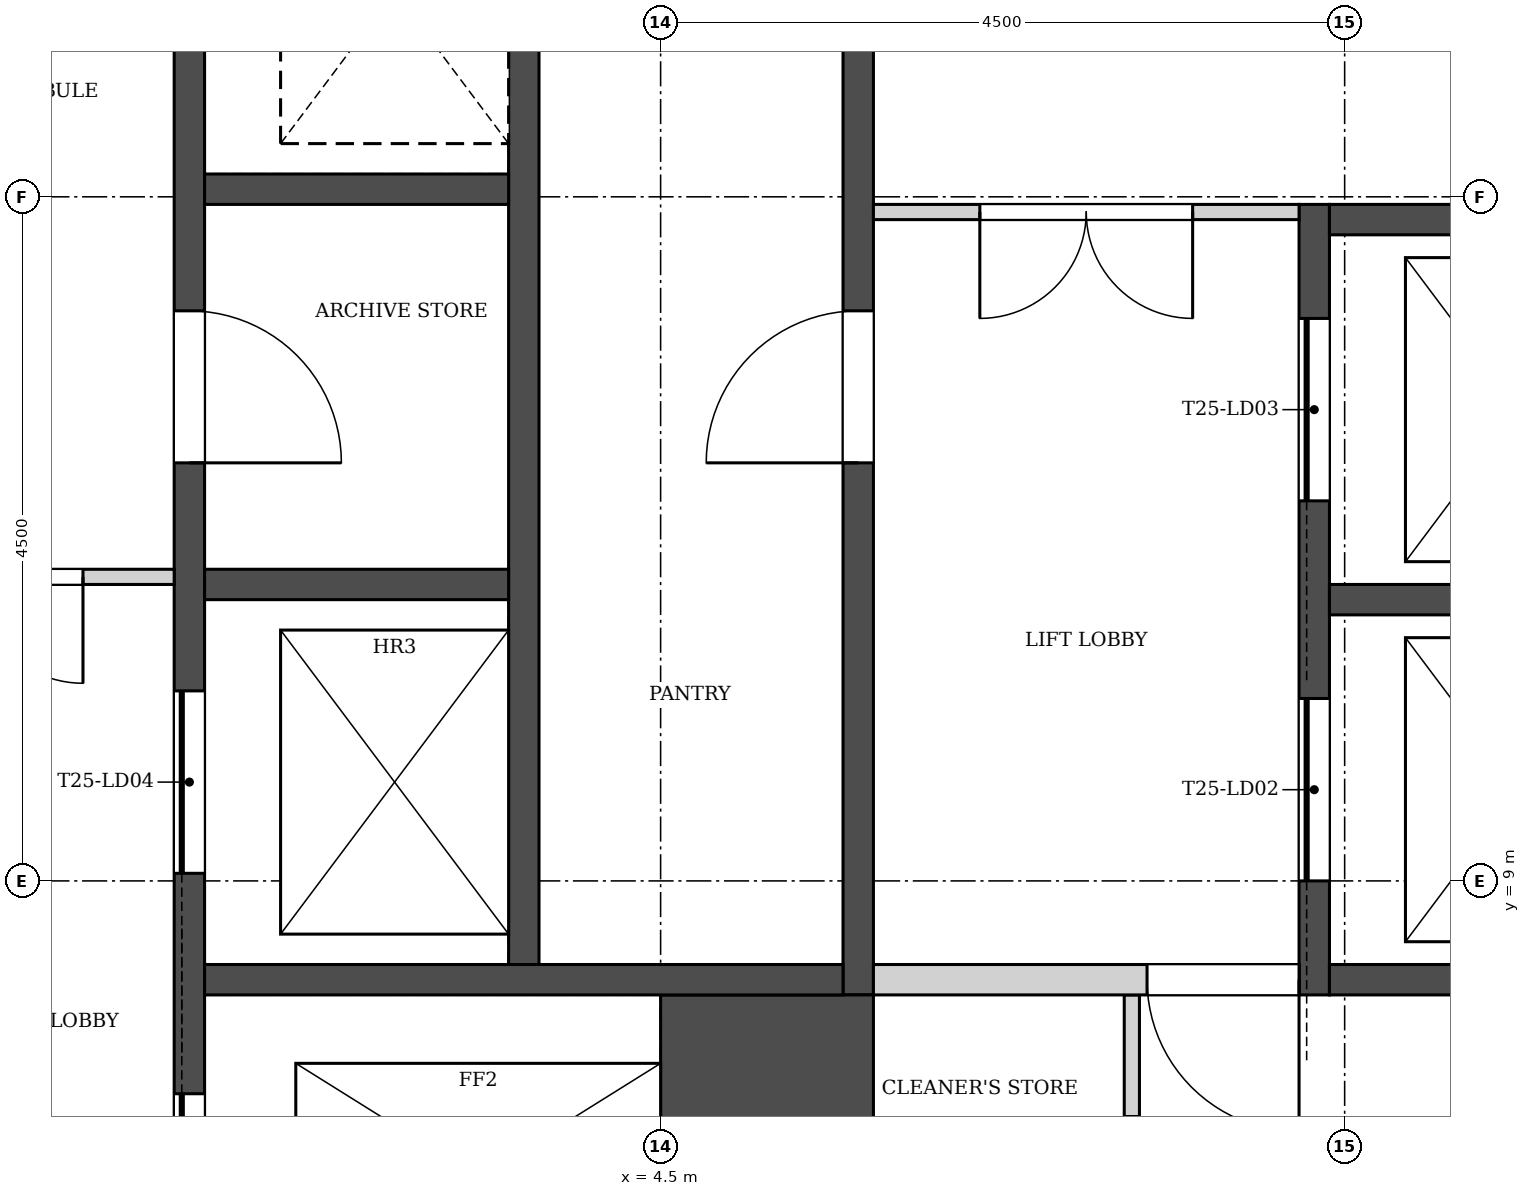
"""IFC4 building model, lengths in metres.
Left out: names, types, materials, properties, quantities, classifications, styles, units other than length and angle.
Written with IfcOpenShell. Run it as: python <this file> out.ifc"""

import sys

from ifc_helpers import new_model, si_unit, direction, frame, frame_2d, origin, place, context, subcontext, project, spatial, rectangle, extrude, element, fill, save


model = new_model("IFC4")
c1 = context("Model", 3, precision=1e-05, world=origin(), true_north=direction((0.0, 1.0)))
c2 = subcontext(c1, "Body", "Model", "MODEL_VIEW")
j1 = project(units=[si_unit("LENGTHUNIT", "METRE"), si_unit("PLANEANGLEUNIT", "RADIAN")], contexts=[c1])
p1 = place(None, origin())
s1 = spatial("IfcSite", under=j1, at=p1, CompositionType="ELEMENT")
p2 = place(p1, origin())
s2 = spatial("IfcBuilding", under=s1, at=p2, CompositionType="ELEMENT")
p3 = place(p2, frame((0.0, 0.0, 339.3)))
s3 = spatial("IfcBuildingStorey", under=s2, at=p3, CompositionType="ELEMENT", Elevation=339.3)
p4 = place(p3, frame((13.054, 10.692, 0.0), z_axis=(0.0, 0.0, 1.0), x_axis=(-0.500015780397, 0.866016292776, 0.0)))
e1 = element("IfcWall", 1, at=p4, inside=s3, PredefinedType="SHEAR", context=c2, shape_type="SweptSolid", body=[
    extrude(rectangle(XDim=8.67, YDim=0.8, at=frame_2d((4.335, 0.0))), origin(), (0.0, 0.0, 1.0), 5.4),
])
p5 = place(p3, frame((8.8, 8.25, -0.4), z_axis=(0.0, 0.0, 1.0), x_axis=(0.0, 1.0, 0.0)))
e2 = element("IfcWall", 2, at=p5, inside=s3, PredefinedType="SOLIDWALL", context=c2, shape_type="SweptSolid", body=[
    extrude(rectangle(XDim=5.2, YDim=0.2, at=frame_2d((2.6, 0.0))), origin(), (0.0, 0.0, 1.0), 5.0),
])
p6 = place(p5, frame((0.75, 0.0, 0.4)))
e3 = element("IfcOpeningElement", 3, at=p6, cuts=e2, PredefinedType="OPENING", context=c2, shape_type="SweptSolid", body=[
    extrude(rectangle(XDim=1.2, YDim=2.1, at=frame_2d((0.6, 1.05))), frame((0.0, 0.11, 0.0), z_axis=(0.0, -1.0, 0.0), x_axis=(1.0, 0.0, 0.0)), (0.0, 0.0, 1.0), 0.22),
])
p7 = place(p5, frame((3.25, 0.0, 0.4)))
e4 = element("IfcOpeningElement", 4, at=p7, cuts=e2, PredefinedType="OPENING", context=c2, shape_type="SweptSolid", body=[
    extrude(rectangle(XDim=1.2, YDim=2.1, at=frame_2d((0.6, 1.05))), frame((0.0, 0.11, 0.0), z_axis=(0.0, -1.0, 0.0), x_axis=(1.0, 0.0, 0.0)), (0.0, 0.0, 1.0), 0.22),
])
p8 = place(p3, frame((5.8, 8.25, -0.4), z_axis=(0.0, 0.0, 1.0), x_axis=(0.0, 1.0, 0.0)))
e5 = element("IfcWall", 5, at=p8, inside=s3, PredefinedType="SOLIDWALL", context=c2, shape_type="SweptSolid", body=[
    extrude(rectangle(XDim=8.0, YDim=0.2, at=frame_2d((4.0, 0.0))), origin(), (0.0, 0.0, 1.0), 5.0),
])
p9 = place(p8, frame((3.5, 0.0, 0.4)))
e6 = element("IfcOpeningElement", 6, at=p9, cuts=e5, PredefinedType="OPENING", context=c2, shape_type="SweptSolid", body=[
    extrude(rectangle(XDim=1.0, YDim=2.1, at=frame_2d((0.5, 1.05))), frame((0.0, 0.11, 0.0), z_axis=(0.0, -1.0, 0.0), x_axis=(1.0, 0.0, 0.0)), (0.0, 0.0, 1.0), 0.22),
])
p10 = place(p3, frame((3.6, 8.45, -0.4), z_axis=(0.0, 0.0, 1.0), x_axis=(0.0, 1.0, 0.0)))
e7 = element("IfcWall", 7, at=p10, inside=s3, PredefinedType="SOLIDWALL", context=c2, shape_type="SweptSolid", body=[
    extrude(rectangle(XDim=7.8, YDim=0.2, at=frame_2d((3.9, 0.0))), origin(), (0.0, 0.0, 1.0), 5.0),
])
p11 = place(p3, frame((1.4, 5.85, -0.4), z_axis=(0.0, 0.0, 1.0), x_axis=(0.0, 1.0, 0.0)))
e8 = element("IfcWall", 8, at=p11, inside=s3, PredefinedType="SOLIDWALL", context=c2, shape_type="SweptSolid", body=[
    extrude(rectangle(XDim=11.75, YDim=0.2, at=frame_2d((5.875, 0.0))), origin(), (0.0, 0.0, 1.0), 5.0),
])
p12 = place(p11, frame((3.2, 0.0, 0.4)))
e9 = element("IfcOpeningElement", 9, at=p12, cuts=e8, PredefinedType="OPENING", context=c2, shape_type="SweptSolid", body=[
    extrude(rectangle(XDim=1.2, YDim=2.1, at=frame_2d((0.6, 1.05))), frame((0.0, 0.11, 0.0), z_axis=(0.0, -1.0, 0.0), x_axis=(1.0, 0.0, 0.0)), (0.0, 0.0, 1.0), 0.22),
])
p13 = place(p11, frame((0.65, 0.0, 0.4)))
e10 = element("IfcOpeningElement", 10, at=p13, cuts=e8, PredefinedType="OPENING", context=c2, shape_type="SweptSolid", body=[
    extrude(rectangle(XDim=1.1, YDim=2.1, at=frame_2d((0.55, 1.05))), frame((0.0, 0.11, 0.0), z_axis=(0.0, -1.0, 0.0), x_axis=(1.0, 0.0, 0.0)), (0.0, 0.0, 1.0), 0.22),
])
p14 = place(p11, frame((5.9, 0.0, 0.4)))
e11 = element("IfcOpeningElement", 11, at=p14, cuts=e8, PredefinedType="OPENING", context=c2, shape_type="SweptSolid", body=[
    extrude(rectangle(XDim=1.0, YDim=2.1, at=frame_2d((0.5, 1.05))), frame((0.0, 0.11, 0.0), z_axis=(0.0, -1.0, 0.0), x_axis=(1.0, 0.0, 0.0)), (0.0, 0.0, 1.0), 0.22),
])
p15 = place(p3, frame((5.2, 5.85, -0.4), z_axis=(0.0, 0.0, 1.0), x_axis=(0.0, 1.0, 0.0)))
e12 = element("IfcWall", 12, at=p15, inside=s3, PredefinedType="SOLIDWALL", context=c2, shape_type="SweptSolid", body=[
    extrude(rectangle(XDim=2.4, YDim=1.4, at=frame_2d((1.2, 0.0))), origin(), (0.0, 0.0, 1.0), 5.0),
])
p16 = place(p3, frame((8.9, 8.35, -0.4), z_axis=(0.0, 0.0, 1.0), x_axis=(1.0, 0.0, 0.0)))
e13 = element("IfcWall", 13, at=p16, inside=s3, PredefinedType="SOLIDWALL", context=c2, shape_type="SweptSolid", body=[
    extrude(rectangle(XDim=2.0, YDim=0.2, at=frame_2d((1.0, 0.0))), origin(), (0.0, 0.0, 1.0), 5.0),
])
p17 = place(p3, frame((1.5, 8.35, -0.4), z_axis=(0.0, 0.0, 1.0), x_axis=(1.0, 0.0, 0.0)))
e14 = element("IfcWall", 14, at=p17, inside=s3, PredefinedType="SOLIDWALL", context=c2, shape_type="SweptSolid", body=[
    extrude(rectangle(XDim=4.2, YDim=0.2, at=frame_2d((2.1, 0.0))), origin(), (0.0, 0.0, 1.0), 5.0),
])
for number, where, z_axis, x_axis in (
    (15, (8.9, 10.85, -0.4), (0.0, 0.0, 1.0), (1.0, 0.0, 0.0)),
    (16, (8.9, 13.35, -0.4), (0.0, 0.0, 1.0), (1.0, 0.0, 0.0)),
    (17, (1.5, 10.95, -0.4), (0.0, 0.0, 1.0), (1.0, 0.0, 0.0)),
    (18, (1.5, 13.55, -0.4), (0.0, 0.0, 1.0), (1.0, 0.0, 0.0)),
):
    element("IfcWall", number, at=place(p3, frame(where, z_axis=z_axis, x_axis=x_axis)), inside=s3, PredefinedType="SOLIDWALL", context=c2, shape_type="SweptSolid", body=[
        extrude(rectangle(XDim=2.0, YDim=0.2, at=frame_2d((1.0, 0.0))), origin(), (0.0, 0.0, 1.0), 5.0),
    ])
p18 = place(p3, frame((5.9, 13.4, 0.0), z_axis=(0.0, 0.0, 1.0), x_axis=(1.0, 0.0, 0.0)))
e19 = element("IfcWall", 19, at=p18, inside=s3, PredefinedType="PARTITIONING", context=c2, shape_type="SweptSolid", body=[
    extrude(rectangle(XDim=2.8, YDim=0.1, at=frame_2d((1.4, 0.0))), origin(), (0.0, 0.0, 1.0), 4.6),
])
p19 = place(p18, frame((0.7, 0.0, 0.0)))
e20 = element("IfcOpeningElement", 20, at=p19, cuts=e19, PredefinedType="OPENING", context=c2, shape_type="SweptSolid", body=[
    extrude(rectangle(XDim=1.4, YDim=2.1, at=frame_2d((0.7, 1.05))), frame((0.0, 0.06, 0.0), z_axis=(0.0, -1.0, 0.0), x_axis=(1.0, 0.0, 0.0)), (0.0, 0.0, 1.0), 0.12),
])
p20 = place(p3, frame((7.6, 5.85, 0.0), z_axis=(0.0, 0.0, 1.0), x_axis=(0.0, 1.0, 0.0)))
e21 = element("IfcWall", 21, at=p20, inside=s3, PredefinedType="PARTITIONING", context=c2, shape_type="SweptSolid", body=[
    extrude(rectangle(XDim=2.4, YDim=0.1, at=frame_2d((1.2, 0.0))), origin(), (0.0, 0.0, 1.0), 4.6),
])
p21 = place(p20, frame((0.7, 0.0, 0.0)))
e22 = element("IfcOpeningElement", 22, at=p21, cuts=e21, PredefinedType="OPENING", context=c2, shape_type="SweptSolid", body=[
    extrude(rectangle(XDim=0.9, YDim=2.1, at=frame_2d((0.45, 1.05))), frame((0.0, 0.06, 0.0), z_axis=(0.0, -1.0, 0.0), x_axis=(1.0, 0.0, 0.0)), (0.0, 0.0, 1.0), 0.12),
])
p22 = place(p3, frame((5.9, 8.35, 0.0), z_axis=(0.0, 0.0, 1.0), x_axis=(1.0, 0.0, 0.0)))
e23 = element("IfcWall", 23, at=p22, inside=s3, PredefinedType="SOLIDWALL", context=c2, shape_type="SweptSolid", body=[
    extrude(rectangle(XDim=2.8, YDim=0.2, at=frame_2d((1.4, 0.0))), origin(), (0.0, 0.0, 1.0), 4.6),
])
p23 = place(p22, frame((1.8, 0.0, 0.0)))
e24 = element("IfcOpeningElement", 24, at=p23, cuts=e23, PredefinedType="OPENING", context=c2, shape_type="SweptSolid", body=[
    extrude(rectangle(XDim=1.0, YDim=2.1, at=frame_2d((0.5, 1.05))), frame((0.0, 0.11, 0.0), z_axis=(0.0, -1.0, 0.0), x_axis=(1.0, 0.0, 0.0)), (0.0, 0.0, 1.0), 0.22),
])
p24 = place(p3, frame((-1.3, 11.0, 0.0), z_axis=(0.0, 0.0, 1.0), x_axis=(1.0, 0.0, 0.0)))
e25 = element("IfcWall", 25, at=p24, inside=s3, PredefinedType="PARTITIONING", context=c2, shape_type="SweptSolid", body=[
    extrude(rectangle(XDim=2.6, YDim=0.1, at=frame_2d((1.3, 0.0))), origin(), (0.0, 0.0, 1.0), 4.6),
])
p25 = place(p24, frame((0.6, 0.0, 0.0)))
e26 = element("IfcOpeningElement", 26, at=p25, cuts=e25, PredefinedType="OPENING", context=c2, shape_type="SweptSolid", body=[
    extrude(rectangle(XDim=1.4, YDim=2.1, at=frame_2d((0.7, 1.05))), frame((0.0, 0.06, 0.0), z_axis=(0.0, -1.0, 0.0), x_axis=(1.0, 0.0, 0.0)), (0.0, 0.0, 1.0), 0.12),
])
p26 = place(p6, origin())
e27 = element("IfcDoor", 27, at=p26, inside=s3, OperationType="SLIDING_TO_LEFT", PredefinedType="DOOR", context=c2, shape_type="SweptSolid", body=[
    extrude(rectangle(XDim=1.2, YDim=2.1, at=frame_2d((0.6, 1.05))), frame((0.0, 0.025, 0.0), z_axis=(0.0, -1.0, 0.0), x_axis=(1.0, 0.0, 0.0)), (0.0, 0.0, 1.0), 0.05),
])
fill(e3, e27)
p27 = place(p7, origin())
e28 = element("IfcDoor", 28, at=p27, inside=s3, OperationType="SLIDING_TO_LEFT", PredefinedType="DOOR", context=c2, shape_type="SweptSolid", body=[
    extrude(rectangle(XDim=1.2, YDim=2.1, at=frame_2d((0.6, 1.05))), frame((0.0, 0.025, 0.0), z_axis=(0.0, -1.0, 0.0), x_axis=(1.0, 0.0, 0.0)), (0.0, 0.0, 1.0), 0.05),
])
fill(e4, e28)
p28 = place(p12, origin())
e29 = element("IfcDoor", 29, at=p28, inside=s3, OperationType="SLIDING_TO_LEFT", PredefinedType="DOOR", context=c2, shape_type="SweptSolid", body=[
    extrude(rectangle(XDim=1.2, YDim=2.1, at=frame_2d((0.6, 1.05))), frame((0.0, 0.025, 0.0), z_axis=(0.0, -1.0, 0.0), x_axis=(1.0, 0.0, 0.0)), (0.0, 0.0, 1.0), 0.05),
])
fill(e9, e29)
p29 = place(p13, origin())
e30 = element("IfcDoor", 30, at=p29, inside=s3, OperationType="SLIDING_TO_RIGHT", PredefinedType="DOOR", context=c2, shape_type="SweptSolid", body=[
    extrude(rectangle(XDim=1.1, YDim=2.1, at=frame_2d((0.55, 1.05))), frame((0.0, 0.025, 0.0), z_axis=(0.0, -1.0, 0.0), x_axis=(1.0, 0.0, 0.0)), (0.0, 0.0, 1.0), 0.05),
])
fill(e10, e30)
p30 = place(p9, origin())
e31 = element("IfcDoor", 31, at=p30, inside=s3, OperationType="SINGLE_SWING_LEFT", PredefinedType="DOOR", context=c2, shape_type="SweptSolid", body=[
    extrude(rectangle(XDim=1.0, YDim=2.1, at=frame_2d((0.5, 1.05))), frame((0.0, 0.025, 0.0), z_axis=(0.0, -1.0, 0.0), x_axis=(1.0, 0.0, 0.0)), (0.0, 0.0, 1.0), 0.05),
])
fill(e6, e31)
p31 = place(p14, frame((1.0, 0.0, 0.0), z_axis=(0.0, 0.0, 1.0), x_axis=(-1.0, 0.0, 0.0)))
e32 = element("IfcDoor", 32, at=p31, inside=s3, OperationType="SINGLE_SWING_RIGHT", PredefinedType="DOOR", context=c2, shape_type="SweptSolid", body=[
    extrude(rectangle(XDim=1.0, YDim=2.1, at=frame_2d((0.5, 1.05))), frame((0.0, 0.025, 0.0), z_axis=(0.0, -1.0, 0.0), x_axis=(1.0, 0.0, 0.0)), (0.0, 0.0, 1.0), 0.05),
])
fill(e11, e32)
p32 = place(p19, frame((1.4, 0.0, 0.0), z_axis=(0.0, 0.0, 1.0), x_axis=(-1.0, 0.0, 0.0)))
e33 = element("IfcDoor", 33, at=p32, inside=s3, OperationType="DOUBLE_DOOR_SINGLE_SWING", PredefinedType="DOOR", context=c2, shape_type="SweptSolid", body=[
    extrude(rectangle(XDim=1.4, YDim=2.1, at=frame_2d((0.7, 1.05))), frame((0.0, 0.025, 0.0), z_axis=(0.0, -1.0, 0.0), x_axis=(1.0, 0.0, 0.0)), (0.0, 0.0, 1.0), 0.05),
])
fill(e20, e33)
p33 = place(p23, frame((1.0, 0.0, 0.0), z_axis=(0.0, 0.0, 1.0), x_axis=(-1.0, 0.0, 0.0)))
e34 = element("IfcDoor", 34, at=p33, inside=s3, OperationType="SINGLE_SWING_LEFT", PredefinedType="DOOR", context=c2, shape_type="SweptSolid", body=[
    extrude(rectangle(XDim=1.0, YDim=2.1, at=frame_2d((0.5, 1.05))), frame((0.0, 0.025, 0.0), z_axis=(0.0, -1.0, 0.0), x_axis=(1.0, 0.0, 0.0)), (0.0, 0.0, 1.0), 0.05),
])
fill(e24, e34)
p34 = place(p25, frame((1.4, 0.0, 0.0), z_axis=(0.0, 0.0, 1.0), x_axis=(-1.0, 0.0, 0.0)))
e35 = element("IfcDoor", 35, at=p34, inside=s3, OperationType="DOUBLE_DOOR_SINGLE_SWING", PredefinedType="DOOR", context=c2, shape_type="SweptSolid", body=[
    extrude(rectangle(XDim=1.4, YDim=2.1, at=frame_2d((0.7, 1.05))), frame((0.0, 0.025, 0.0), z_axis=(0.0, -1.0, 0.0), x_axis=(1.0, 0.0, 0.0)), (0.0, 0.0, 1.0), 0.05),
])
fill(e26, e35)
save(model, sys.argv[1])
